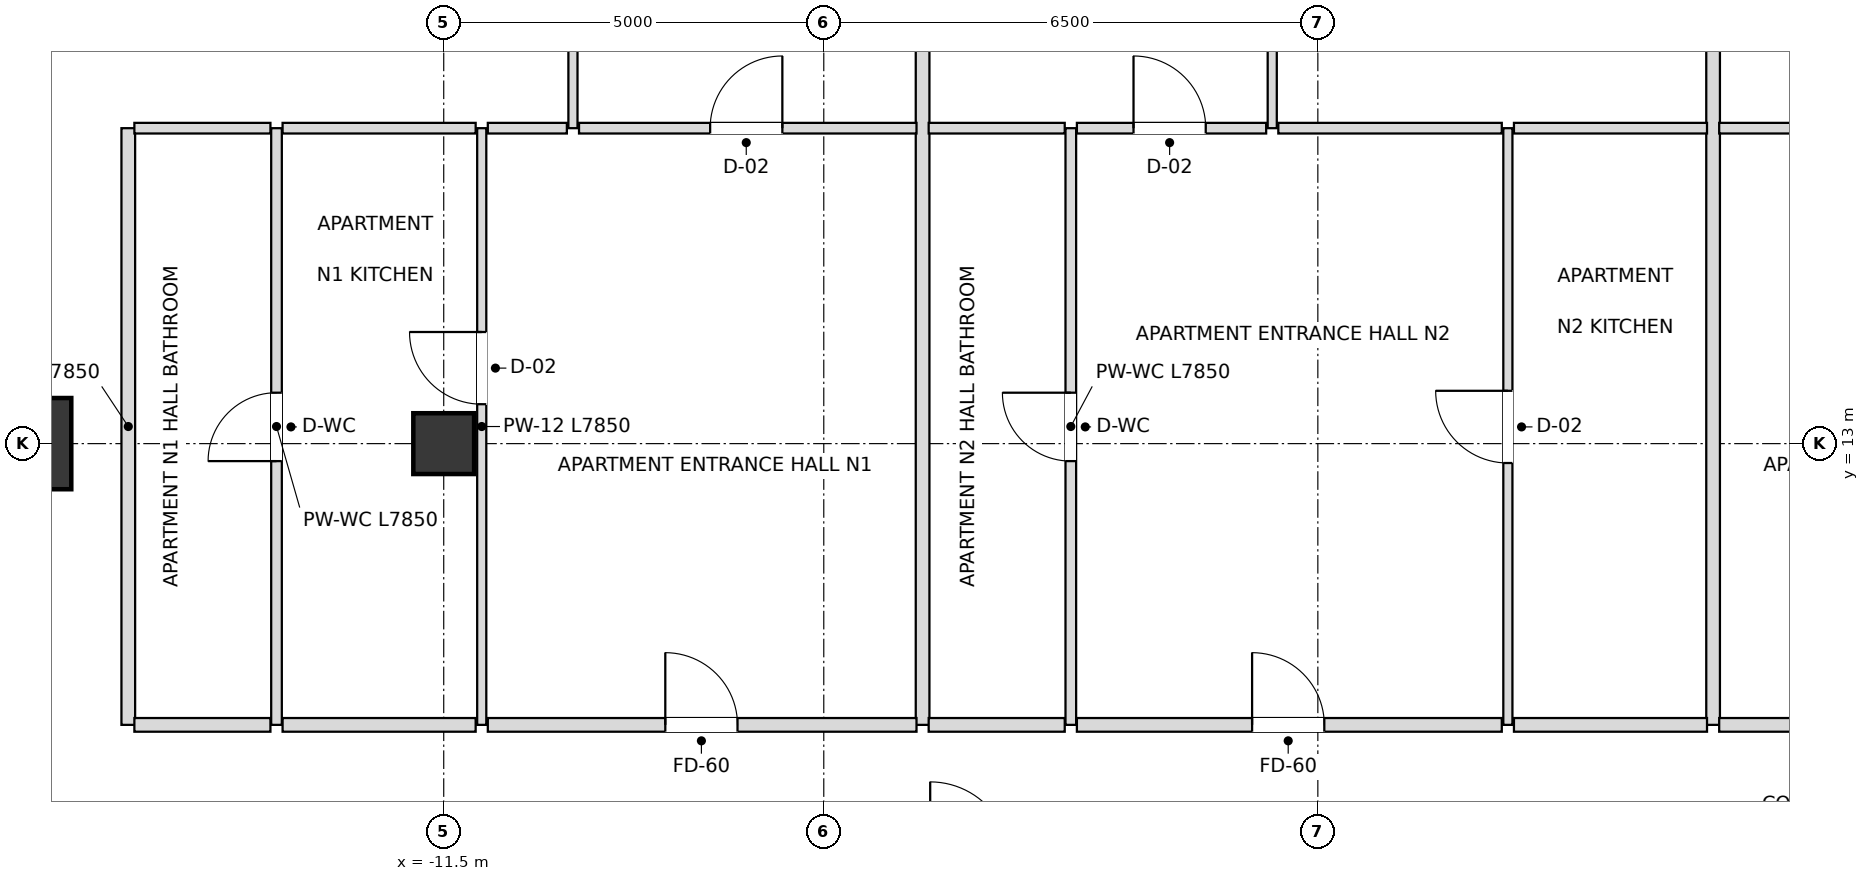
"""IFC4 building model, lengths in metres.
Left out: names, types, materials, properties, quantities, classifications, styles, units other than length and angle.
Written with IfcOpenShell. Run it as: python <this file> out.ifc"""

import sys

from ifc_helpers import new_model, si_unit, direction, frame, frame_2d, origin, origin_2d, place, context, subcontext, project, spatial, rectangle, extrude, element, fill, save


model = new_model("IFC4")
c1 = context("Model", 3, precision=1e-05, world=origin(), true_north=direction((0.0, 1.0)))
c2 = subcontext(c1, "Body", "Model", "MODEL_VIEW")
j1 = project(units=[si_unit("LENGTHUNIT", "METRE"), si_unit("PLANEANGLEUNIT", "RADIAN")], contexts=[c1])
p1 = place(None, origin())
s1 = spatial("IfcSite", under=j1, at=p1, CompositionType="ELEMENT")
p2 = place(p1, origin())
s2 = spatial("IfcBuilding", under=s1, at=p2, CompositionType="ELEMENT")
p3 = place(p2, frame((0.0, 0.0, 109.8)))
s3 = spatial("IfcBuildingStorey", under=s2, at=p3, CompositionType="ELEMENT", Elevation=109.8)
p4 = place(p3, frame((-17.0, 13.0, 0.0), z_axis=(0.0, 0.0, 1.0), x_axis=(1.0, 0.0, 0.0)))
e1 = element("IfcColumn", 1, at=p4, inside=s3, PredefinedType="USERDEFINED", context=c2, shape_type="SweptSolid", body=[
    extrude(rectangle(XDim=1.2, YDim=1.2, at=origin_2d()), origin(), (0.0, 0.0, 1.0), 3.6),
])
p5 = place(p3, frame((-11.5, 13.0, 0.0), z_axis=(0.0, 0.0, 1.0), x_axis=(1.0, 0.0, 0.0)))
e2 = element("IfcColumn", 2, at=p5, inside=s3, PredefinedType="COLUMN", context=c2, shape_type="SweptSolid", body=[
    extrude(rectangle(XDim=0.8, YDim=0.8, at=origin_2d()), origin(), (0.0, 0.0, 1.0), 3.6),
])
p6 = place(p3, frame((-15.65, 9.3, 0.0), z_axis=(0.0, 0.0, 1.0), x_axis=(0.0, 1.0, 0.0)))
e3 = element("IfcWall", 3, at=p6, inside=s3, PredefinedType="PARTITIONING", context=c2, shape_type="SweptSolid", body=[
    extrude(rectangle(XDim=7.85, YDim=0.18, at=frame_2d((3.925, 0.0))), origin(), (0.0, 0.0, 1.0), 2.736),
])
p7 = place(p3, frame((-13.7, 9.3, 0.0), z_axis=(0.0, 0.0, 1.0), x_axis=(0.0, 1.0, 0.0)))
e4 = element("IfcWall", 4, at=p7, inside=s3, PredefinedType="PARTITIONING", context=c2, shape_type="SweptSolid", body=[
    extrude(rectangle(XDim=7.85, YDim=0.14, at=frame_2d((3.925, 0.0))), origin(), (0.0, 0.0, 1.0), 2.736),
])
p8 = place(p7, frame((3.47, 0.0, 0.0)))
e5 = element("IfcOpeningElement", 5, at=p8, cuts=e4, PredefinedType="OPENING", context=c2, shape_type="SweptSolid", body=[
    extrude(rectangle(XDim=0.9, YDim=2.1, at=frame_2d((0.45, 1.05))), frame((0.0, 0.08, 0.0), z_axis=(0.0, -1.0, 0.0), x_axis=(1.0, 0.0, 0.0)), (0.0, 0.0, 1.0), 0.16),
])
p9 = place(p3, frame((-11.0, 9.3, 0.0), z_axis=(0.0, 0.0, 1.0), x_axis=(0.0, 1.0, 0.0)))
e6 = element("IfcWall", 6, at=p9, inside=s3, PredefinedType="PARTITIONING", context=c2, shape_type="SweptSolid", body=[
    extrude(rectangle(XDim=7.85, YDim=0.12, at=frame_2d((3.925, 0.0))), origin(), (0.0, 0.0, 1.0), 2.816),
])
p10 = place(p9, frame((4.219, 0.0, 0.0)))
e7 = element("IfcOpeningElement", 7, at=p10, cuts=e6, PredefinedType="OPENING", context=c2, shape_type="SweptSolid", body=[
    extrude(rectangle(XDim=0.95, YDim=2.1, at=frame_2d((0.475, 1.05))), frame((0.0, 0.07, 0.0), z_axis=(0.0, -1.0, 0.0), x_axis=(1.0, 0.0, 0.0)), (0.0, 0.0, 1.0), 0.14),
])
p11 = place(p3, frame((-9.8, 17.15, 0.0), z_axis=(0.0, 0.0, 1.0), x_axis=(0.0, 1.0, 0.0)))
e8 = element("IfcWall", 8, at=p11, inside=s3, PredefinedType="PARTITIONING", context=c2, shape_type="SweptSolid", body=[
    extrude(rectangle(XDim=6.0, YDim=0.12, at=frame_2d((3.0, 0.0))), origin(), (0.0, 0.0, 1.0), 2.816),
])
p12 = place(p11, frame((3.701, 0.0, 0.0)))
e9 = element("IfcOpeningElement", 9, at=p12, cuts=e8, PredefinedType="OPENING", context=c2, shape_type="SweptSolid", body=[
    extrude(rectangle(XDim=0.9, YDim=2.1, at=frame_2d((0.45, 1.05))), frame((0.0, 0.07, 0.0), z_axis=(0.0, -1.0, 0.0), x_axis=(1.0, 0.0, 0.0)), (0.0, 0.0, 1.0), 0.14),
])
p13 = place(p3, frame((-5.2, 9.3, 0.0), z_axis=(0.0, 0.0, 1.0), x_axis=(0.0, 1.0, 0.0)))
e10 = element("IfcWall", 10, at=p13, inside=s3, PredefinedType="PARTITIONING", context=c2, shape_type="SweptSolid", body=[
    extrude(rectangle(XDim=13.85, YDim=0.18, at=frame_2d((6.925, 0.0))), origin(), (0.0, 0.0, 1.0), 2.816),
])
p14 = place(p3, frame((-3.25, 9.3, 0.0), z_axis=(0.0, 0.0, 1.0), x_axis=(0.0, 1.0, 0.0)))
e11 = element("IfcWall", 11, at=p14, inside=s3, PredefinedType="PARTITIONING", context=c2, shape_type="SweptSolid", body=[
    extrude(rectangle(XDim=7.85, YDim=0.14, at=frame_2d((3.925, 0.0))), origin(), (0.0, 0.0, 1.0), 3.38),
])
p15 = place(p14, frame((3.47, 0.0, 0.0)))
e12 = element("IfcOpeningElement", 12, at=p15, cuts=e11, PredefinedType="OPENING", context=c2, shape_type="SweptSolid", body=[
    extrude(rectangle(XDim=0.9, YDim=2.1, at=frame_2d((0.45, 1.05))), frame((0.0, 0.08, 0.0), z_axis=(0.0, -1.0, 0.0), x_axis=(1.0, 0.0, 0.0)), (0.0, 0.0, 1.0), 0.16),
])
p16 = place(p3, frame((-0.6, 17.15, 0.0), z_axis=(0.0, 0.0, 1.0), x_axis=(0.0, 1.0, 0.0)))
e13 = element("IfcWall", 13, at=p16, inside=s3, PredefinedType="PARTITIONING", context=c2, shape_type="SweptSolid", body=[
    extrude(rectangle(XDim=6.0, YDim=0.12, at=frame_2d((3.0, 0.0))), origin(), (0.0, 0.0, 1.0), 2.816),
])
p17 = place(p16, frame((2.55, 0.0, 0.0)))
e14 = element("IfcOpeningElement", 14, at=p17, cuts=e13, PredefinedType="OPENING", context=c2, shape_type="SweptSolid", body=[
    extrude(rectangle(XDim=0.9, YDim=2.1, at=frame_2d((0.45, 1.05))), frame((0.0, 0.07, 0.0), z_axis=(0.0, -1.0, 0.0), x_axis=(1.0, 0.0, 0.0)), (0.0, 0.0, 1.0), 0.14),
])
p18 = place(p3, frame((2.5, 9.3, 0.0), z_axis=(0.0, 0.0, 1.0), x_axis=(0.0, 1.0, 0.0)))
e15 = element("IfcWall", 15, at=p18, inside=s3, PredefinedType="PARTITIONING", context=c2, shape_type="SweptSolid", body=[
    extrude(rectangle(XDim=7.85, YDim=0.12, at=frame_2d((3.925, 0.0))), origin(), (0.0, 0.0, 1.0), 3.38),
])
p19 = place(p18, frame((3.445, 0.0, 0.0)))
e16 = element("IfcOpeningElement", 16, at=p19, cuts=e15, PredefinedType="OPENING", context=c2, shape_type="SweptSolid", body=[
    extrude(rectangle(XDim=0.95, YDim=2.1, at=frame_2d((0.475, 1.05))), frame((0.0, 0.07, 0.0), z_axis=(0.0, -1.0, 0.0), x_axis=(1.0, 0.0, 0.0)), (0.0, 0.0, 1.0), 0.14),
])
p20 = place(p3, frame((5.2, 9.3, 0.0), z_axis=(0.0, 0.0, 1.0), x_axis=(0.0, 1.0, 0.0)))
e17 = element("IfcWall", 17, at=p20, inside=s3, PredefinedType="PARTITIONING", context=c2, shape_type="SweptSolid", body=[
    extrude(rectangle(XDim=13.85, YDim=0.18, at=frame_2d((6.925, 0.0))), origin(), (0.0, 0.0, 1.0), 2.816),
])
p21 = place(p3, frame((-15.57, 9.3, 0.0), z_axis=(0.0, 0.0, 1.0), x_axis=(1.0, 0.0, 0.0)))
e18 = element("IfcWall", 18, at=p21, inside=s3, PredefinedType="PARTITIONING", context=c2, shape_type="SweptSolid", body=[
    extrude(rectangle(XDim=1.79, YDim=0.18, at=frame_2d((0.895, 0.0))), origin(), (0.0, 0.0, 1.0), 3.38),
])
p22 = place(p3, frame((-13.62, 9.3, 0.0), z_axis=(0.0, 0.0, 1.0), x_axis=(1.0, 0.0, 0.0)))
e19 = element("IfcWall", 19, at=p22, inside=s3, PredefinedType="PARTITIONING", context=c2, shape_type="SweptSolid", body=[
    extrude(rectangle(XDim=2.54, YDim=0.18, at=frame_2d((1.27, 0.0))), origin(), (0.0, 0.0, 1.0), 3.38),
])
p23 = place(p3, frame((-10.92, 9.3, 0.0), z_axis=(0.0, 0.0, 1.0), x_axis=(1.0, 0.0, 0.0)))
e20 = element("IfcWall", 20, at=p23, inside=s3, PredefinedType="PARTITIONING", context=c2, shape_type="SweptSolid", body=[
    extrude(rectangle(XDim=5.64, YDim=0.18, at=frame_2d((2.82, 0.0))), origin(), (0.0, 0.0, 1.0), 2.816),
])
p24 = place(p23, frame((2.335, 0.0, 0.0)))
e21 = element("IfcOpeningElement", 21, at=p24, cuts=e20, PredefinedType="OPENING", context=c2, shape_type="SweptSolid", body=[
    extrude(rectangle(XDim=0.95, YDim=2.15, at=frame_2d((0.475, 1.075))), frame((0.0, 0.1, 0.0), z_axis=(0.0, -1.0, 0.0), x_axis=(1.0, 0.0, 0.0)), (0.0, 0.0, 1.0), 0.2),
])
p25 = place(p3, frame((-5.12, 9.3, 0.0), z_axis=(0.0, 0.0, 1.0), x_axis=(1.0, 0.0, 0.0)))
e22 = element("IfcWall", 22, at=p25, inside=s3, PredefinedType="PARTITIONING", context=c2, shape_type="SweptSolid", body=[
    extrude(rectangle(XDim=1.79, YDim=0.18, at=frame_2d((0.895, 0.0))), origin(), (0.0, 0.0, 1.0), 3.38),
])
p26 = place(p3, frame((-3.17, 9.3, 0.0), z_axis=(0.0, 0.0, 1.0), x_axis=(1.0, 0.0, 0.0)))
e23 = element("IfcWall", 23, at=p26, inside=s3, PredefinedType="PARTITIONING", context=c2, shape_type="SweptSolid", body=[
    extrude(rectangle(XDim=5.59, YDim=0.18, at=frame_2d((2.795, 0.0))), origin(), (0.0, 0.0, 1.0), 3.38),
])
p27 = place(p26, frame((2.305, 0.0, 0.0)))
e24 = element("IfcOpeningElement", 24, at=p27, cuts=e23, PredefinedType="OPENING", context=c2, shape_type="SweptSolid", body=[
    extrude(rectangle(XDim=0.95, YDim=2.15, at=frame_2d((0.475, 1.075))), frame((0.0, 0.1, 0.0), z_axis=(0.0, -1.0, 0.0), x_axis=(1.0, 0.0, 0.0)), (0.0, 0.0, 1.0), 0.2),
])
p28 = place(p3, frame((2.58, 9.3, 0.0), z_axis=(0.0, 0.0, 1.0), x_axis=(1.0, 0.0, 0.0)))
e25 = element("IfcWall", 25, at=p28, inside=s3, PredefinedType="PARTITIONING", context=c2, shape_type="SweptSolid", body=[
    extrude(rectangle(XDim=2.54, YDim=0.18, at=frame_2d((1.27, 0.0))), origin(), (0.0, 0.0, 1.0), 3.38),
])
p29 = place(p3, frame((5.28, 9.3, 0.0), z_axis=(0.0, 0.0, 1.0), x_axis=(1.0, 0.0, 0.0)))
e26 = element("IfcWall", 26, at=p29, inside=s3, PredefinedType="PARTITIONING", context=c2, shape_type="SweptSolid", body=[
    extrude(rectangle(XDim=5.64, YDim=0.18, at=frame_2d((2.82, 0.0))), origin(), (0.0, 0.0, 1.0), 2.816),
])
p30 = place(p29, frame((2.345, 0.0, 0.0)))
e27 = element("IfcOpeningElement", 27, at=p30, cuts=e26, PredefinedType="OPENING", context=c2, shape_type="SweptSolid", body=[
    extrude(rectangle(XDim=0.95, YDim=2.15, at=frame_2d((0.475, 1.075))), frame((0.0, 0.1, 0.0), z_axis=(0.0, -1.0, 0.0), x_axis=(1.0, 0.0, 0.0)), (0.0, 0.0, 1.0), 0.2),
])
p31 = place(p3, frame((-15.57, 17.15, 0.0), z_axis=(0.0, 0.0, 1.0), x_axis=(1.0, 0.0, 0.0)))
e28 = element("IfcWall", 28, at=p31, inside=s3, PredefinedType="PARTITIONING", context=c2, shape_type="SweptSolid", body=[
    extrude(rectangle(XDim=1.79, YDim=0.14, at=frame_2d((0.895, 0.0))), origin(), (0.0, 0.0, 1.0), 2.736),
])
p32 = place(p3, frame((-13.62, 17.15, 0.0), z_axis=(0.0, 0.0, 1.0), x_axis=(1.0, 0.0, 0.0)))
e29 = element("IfcWall", 29, at=p32, inside=s3, PredefinedType="PARTITIONING", context=c2, shape_type="SweptSolid", body=[
    extrude(rectangle(XDim=2.54, YDim=0.14, at=frame_2d((1.27, 0.0))), origin(), (0.0, 0.0, 1.0), 2.736),
])
p33 = place(p3, frame((-10.92, 17.15, 0.0), z_axis=(0.0, 0.0, 1.0), x_axis=(1.0, 0.0, 0.0)))
e30 = element("IfcWall", 30, at=p33, inside=s3, PredefinedType="PARTITIONING", context=c2, shape_type="SweptSolid", body=[
    extrude(rectangle(XDim=1.04, YDim=0.14, at=frame_2d((0.52, 0.0))), origin(), (0.0, 0.0, 1.0), 3.38),
])
p34 = place(p3, frame((-9.72, 17.15, 0.0), z_axis=(0.0, 0.0, 1.0), x_axis=(1.0, 0.0, 0.0)))
e31 = element("IfcWall", 31, at=p34, inside=s3, PredefinedType="PARTITIONING", context=c2, shape_type="SweptSolid", body=[
    extrude(rectangle(XDim=4.44, YDim=0.14, at=frame_2d((2.22, 0.0))), origin(), (0.0, 0.0, 1.0), 2.816),
])
p35 = place(p34, frame((1.725, 0.0, 0.0)))
e32 = element("IfcOpeningElement", 32, at=p35, cuts=e31, PredefinedType="OPENING", context=c2, shape_type="SweptSolid", body=[
    extrude(rectangle(XDim=0.95, YDim=2.1, at=frame_2d((0.475, 1.05))), frame((0.0, 0.08, 0.0), z_axis=(0.0, -1.0, 0.0), x_axis=(1.0, 0.0, 0.0)), (0.0, 0.0, 1.0), 0.16),
])
p36 = place(p3, frame((-5.12, 17.15, 0.0), z_axis=(0.0, 0.0, 1.0), x_axis=(1.0, 0.0, 0.0)))
e33 = element("IfcWall", 33, at=p36, inside=s3, PredefinedType="PARTITIONING", context=c2, shape_type="SweptSolid", body=[
    extrude(rectangle(XDim=1.79, YDim=0.14, at=frame_2d((0.895, 0.0))), origin(), (0.0, 0.0, 1.0), 3.38),
])
p37 = place(p3, frame((-3.17, 17.15, 0.0), z_axis=(0.0, 0.0, 1.0), x_axis=(1.0, 0.0, 0.0)))
e34 = element("IfcWall", 34, at=p37, inside=s3, PredefinedType="PARTITIONING", context=c2, shape_type="SweptSolid", body=[
    extrude(rectangle(XDim=2.49, YDim=0.14, at=frame_2d((1.245, 0.0))), origin(), (0.0, 0.0, 1.0), 3.38),
])
p38 = place(p37, frame((0.745, 0.0, 0.0)))
e35 = element("IfcOpeningElement", 35, at=p38, cuts=e34, PredefinedType="OPENING", context=c2, shape_type="SweptSolid", body=[
    extrude(rectangle(XDim=0.95, YDim=2.1, at=frame_2d((0.475, 1.05))), frame((0.0, 0.08, 0.0), z_axis=(0.0, -1.0, 0.0), x_axis=(1.0, 0.0, 0.0)), (0.0, 0.0, 1.0), 0.16),
])
p39 = place(p3, frame((-0.52, 17.15, 0.0), z_axis=(0.0, 0.0, 1.0), x_axis=(1.0, 0.0, 0.0)))
e36 = element("IfcWall", 36, at=p39, inside=s3, PredefinedType="PARTITIONING", context=c2, shape_type="SweptSolid", body=[
    extrude(rectangle(XDim=2.94, YDim=0.14, at=frame_2d((1.47, 0.0))), origin(), (0.0, 0.0, 1.0), 3.38),
])
p40 = place(p3, frame((2.58, 17.15, 0.0), z_axis=(0.0, 0.0, 1.0), x_axis=(1.0, 0.0, 0.0)))
e37 = element("IfcWall", 37, at=p40, inside=s3, PredefinedType="PARTITIONING", context=c2, shape_type="SweptSolid", body=[
    extrude(rectangle(XDim=2.54, YDim=0.14, at=frame_2d((1.27, 0.0))), origin(), (0.0, 0.0, 1.0), 3.38),
])
p41 = place(p3, frame((5.28, 17.15, 0.0), z_axis=(0.0, 0.0, 1.0), x_axis=(1.0, 0.0, 0.0)))
e38 = element("IfcWall", 38, at=p41, inside=s3, PredefinedType="PARTITIONING", context=c2, shape_type="SweptSolid", body=[
    extrude(rectangle(XDim=4.44, YDim=0.14, at=frame_2d((2.22, 0.0))), origin(), (0.0, 0.0, 1.0), 2.816),
])
p42 = place(p41, frame((1.765, 0.0, 0.0)))
e39 = element("IfcOpeningElement", 39, at=p42, cuts=e38, PredefinedType="OPENING", context=c2, shape_type="SweptSolid", body=[
    extrude(rectangle(XDim=0.95, YDim=2.1, at=frame_2d((0.475, 1.05))), frame((0.0, 0.08, 0.0), z_axis=(0.0, -1.0, 0.0), x_axis=(1.0, 0.0, 0.0)), (0.0, 0.0, 1.0), 0.16),
])
p43 = place(p24, origin())
e40 = element("IfcDoor", 40, at=p43, inside=s3, OperationType="SINGLE_SWING_LEFT", PredefinedType="DOOR", context=c2, shape_type="SweptSolid", body=[
    extrude(rectangle(XDim=0.95, YDim=2.15, at=frame_2d((0.475, 1.075))), frame((0.0, 0.025, 0.0), z_axis=(0.0, -1.0, 0.0), x_axis=(1.0, 0.0, 0.0)), (0.0, 0.0, 1.0), 0.05),
])
fill(e21, e40)
p44 = place(p10, origin())
e41 = element("IfcDoor", 41, at=p44, inside=s3, OperationType="SINGLE_SWING_RIGHT", PredefinedType="DOOR", context=c2, shape_type="SweptSolid", body=[
    extrude(rectangle(XDim=0.95, YDim=2.1, at=frame_2d((0.475, 1.05))), frame((0.0, 0.025, 0.0), z_axis=(0.0, -1.0, 0.0), x_axis=(1.0, 0.0, 0.0)), (0.0, 0.0, 1.0), 0.05),
])
fill(e7, e41)
p45 = place(p8, origin())
e42 = element("IfcDoor", 42, at=p45, inside=s3, OperationType="SINGLE_SWING_LEFT", PredefinedType="DOOR", context=c2, shape_type="SweptSolid", body=[
    extrude(rectangle(XDim=0.9, YDim=2.1, at=frame_2d((0.45, 1.05))), frame((0.0, 0.025, 0.0), z_axis=(0.0, -1.0, 0.0), x_axis=(1.0, 0.0, 0.0)), (0.0, 0.0, 1.0), 0.05),
])
fill(e5, e42)
p46 = place(p35, origin())
e43 = element("IfcDoor", 43, at=p46, inside=s3, OperationType="SINGLE_SWING_RIGHT", PredefinedType="DOOR", context=c2, shape_type="SweptSolid", body=[
    extrude(rectangle(XDim=0.95, YDim=2.1, at=frame_2d((0.475, 1.05))), frame((0.0, 0.025, 0.0), z_axis=(0.0, -1.0, 0.0), x_axis=(1.0, 0.0, 0.0)), (0.0, 0.0, 1.0), 0.05),
])
fill(e32, e43)
p47 = place(p15, origin())
e44 = element("IfcDoor", 44, at=p47, inside=s3, OperationType="SINGLE_SWING_RIGHT", PredefinedType="DOOR", context=c2, shape_type="SweptSolid", body=[
    extrude(rectangle(XDim=0.9, YDim=2.1, at=frame_2d((0.45, 1.05))), frame((0.0, 0.025, 0.0), z_axis=(0.0, -1.0, 0.0), x_axis=(1.0, 0.0, 0.0)), (0.0, 0.0, 1.0), 0.05),
])
fill(e12, e44)
p48 = place(p27, origin())
e45 = element("IfcDoor", 45, at=p48, inside=s3, OperationType="SINGLE_SWING_LEFT", PredefinedType="DOOR", context=c2, shape_type="SweptSolid", body=[
    extrude(rectangle(XDim=0.95, YDim=2.15, at=frame_2d((0.475, 1.075))), frame((0.0, 0.025, 0.0), z_axis=(0.0, -1.0, 0.0), x_axis=(1.0, 0.0, 0.0)), (0.0, 0.0, 1.0), 0.05),
])
fill(e24, e45)
p49 = place(p19, origin())
e46 = element("IfcDoor", 46, at=p49, inside=s3, OperationType="SINGLE_SWING_RIGHT", PredefinedType="DOOR", context=c2, shape_type="SweptSolid", body=[
    extrude(rectangle(XDim=0.95, YDim=2.1, at=frame_2d((0.475, 1.05))), frame((0.0, 0.025, 0.0), z_axis=(0.0, -1.0, 0.0), x_axis=(1.0, 0.0, 0.0)), (0.0, 0.0, 1.0), 0.05),
])
fill(e16, e46)
p50 = place(p38, origin())
e47 = element("IfcDoor", 47, at=p50, inside=s3, OperationType="SINGLE_SWING_LEFT", PredefinedType="DOOR", context=c2, shape_type="SweptSolid", body=[
    extrude(rectangle(XDim=0.95, YDim=2.1, at=frame_2d((0.475, 1.05))), frame((0.0, 0.025, 0.0), z_axis=(0.0, -1.0, 0.0), x_axis=(1.0, 0.0, 0.0)), (0.0, 0.0, 1.0), 0.05),
])
fill(e35, e47)
save(model, sys.argv[1])
